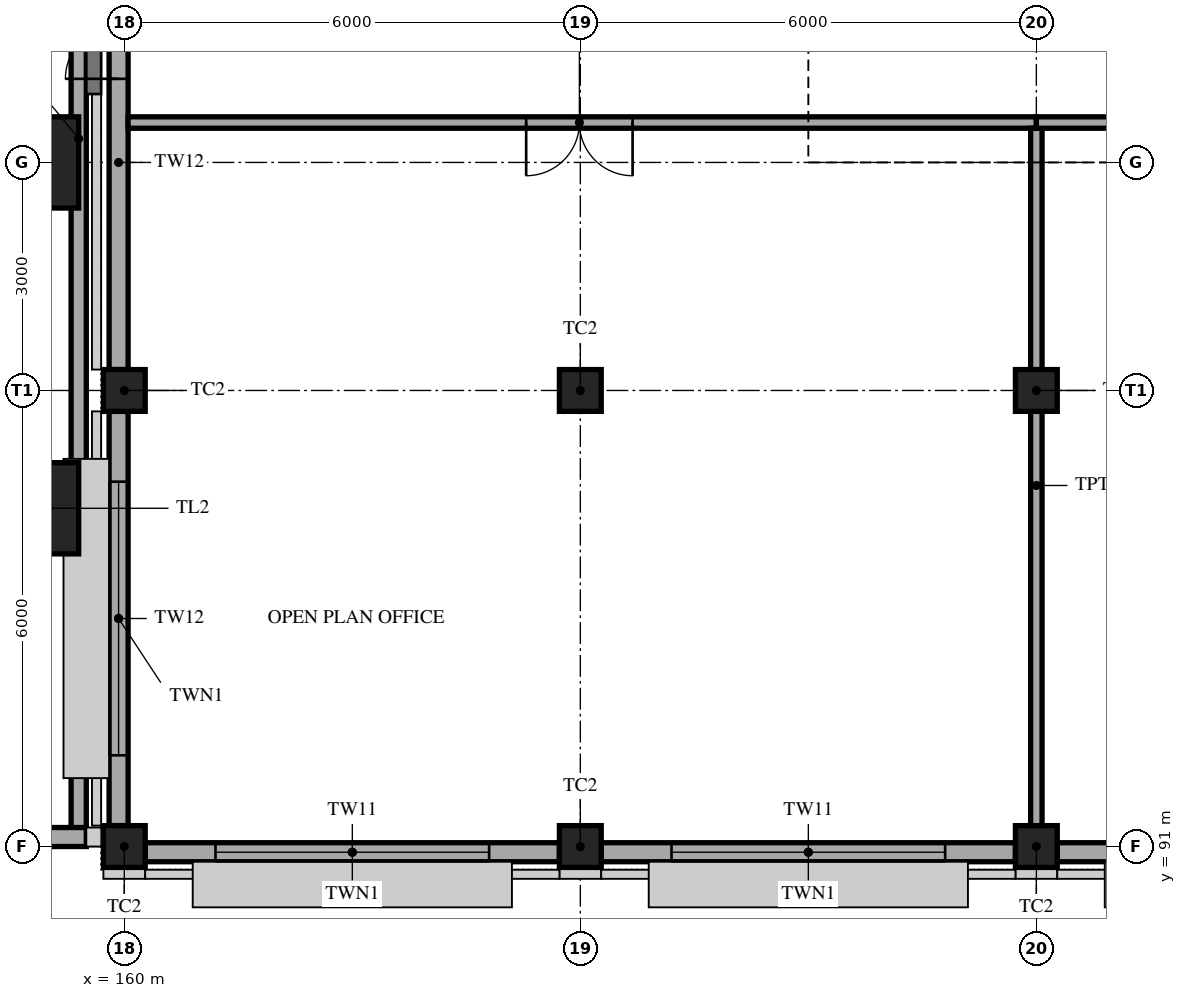
"""IFC4 building model, lengths in metres.
Left out: names, types, materials, properties, quantities, classifications, styles, units other than length and angle.
Written with IfcOpenShell. Run it as: python <this file> out.ifc"""

import sys

from ifc_helpers import new_model, si_unit, direction, frame, frame_2d, origin, origin_2d, place, context, subcontext, project, spatial, polyline, rectangle, hollow_rectangle, outline, extrude, element, fill, save


model = new_model("IFC4")
c1 = context("Model", 3, precision=1e-05, world=origin(), true_north=direction((0.0, 1.0)))
c2 = subcontext(c1, "Body", "Model", "MODEL_VIEW")
j1 = project(units=[si_unit("LENGTHUNIT", "METRE"), si_unit("PLANEANGLEUNIT", "RADIAN")], contexts=[c1])
p1 = place(None, origin())
s1 = spatial("IfcSite", under=j1, at=p1, CompositionType="ELEMENT")
p2 = place(p1, origin())
s2 = spatial("IfcBuilding", under=s1, at=p2, CompositionType="ELEMENT")
p3 = place(p2, frame((0.0, 0.0, 15.0)))
s3 = spatial("IfcBuildingStorey", under=s2, at=p3, CompositionType="ELEMENT", Elevation=15.0)
for number, where, z_axis, x_axis in (
    (1, (160.0, 91.0, 0.0), (0.0, 0.0, 1.0), (1.0, 0.0, 0.0)),
    (2, (160.0, 97.0, 0.0), (0.0, 0.0, 1.0), (1.0, 0.0, 0.0)),
    (3, (166.0, 91.0, 0.0), (0.0, 0.0, 1.0), (1.0, 0.0, 0.0)),
    (4, (172.0, 91.0, 0.0), (0.0, 0.0, 1.0), (1.0, 0.0, 0.0)),
    (5, (166.0, 97.0, 0.0), (0.0, 0.0, 1.0), (1.0, 0.0, 0.0)),
    (6, (172.0, 97.0, 0.0), (0.0, 0.0, 1.0), (1.0, 0.0, 0.0)),
):
    element("IfcColumn", number, at=place(p3, frame(where, z_axis=z_axis, x_axis=x_axis)), inside=s3, PredefinedType="COLUMN", context=c2, shape_type="SweptSolid", body=[
        extrude(hollow_rectangle(XDim=0.55, YDim=0.55, WallThickness=0.032, at=origin_2d()), origin(), (0.0, 0.0, 1.0), 4.2),
    ])
for number, where, z_axis, x_axis in (
    (7, (159.0, 95.45, 0.0), (0.0, 0.0, 1.0), (1.0, 0.0, 0.0)),
    (8, (159.0, 100.0, 0.0), (0.0, 0.0, 1.0), (1.0, 0.0, 0.0)),
):
    element("IfcColumn", number, at=place(p3, frame(where, z_axis=z_axis, x_axis=x_axis)), inside=s3, PredefinedType="COLUMN", context=c2, shape_type="SweptSolid", body=[
        extrude(rectangle(XDim=0.8, YDim=1.2, at=origin_2d()), origin(), (0.0, 0.0, 1.0), 4.2),
    ])
p4 = place(p3, frame((150.8, 91.125, 4.2), z_axis=(0.0, 0.0, 1.0), x_axis=(1.0, 0.0, 0.0)))
e9 = element("IfcWall", 9, at=p4, inside=s3, PredefinedType="PARAPET", context=c2, shape_type="SweptSolid", body=[
    extrude(rectangle(XDim=8.6, YDim=0.2, at=frame_2d((4.3, 0.0))), origin(), (0.0, 0.0, 1.0), 1.1),
])
p5 = place(p3, frame((159.4, 91.225, 4.2), z_axis=(0.0, 0.0, 1.0), x_axis=(0.0, 1.0, 0.0)))
e10 = element("IfcWall", 10, at=p5, inside=s3, PredefinedType="PARAPET", context=c2, shape_type="SweptSolid", body=[
    extrude(rectangle(XDim=18.175, YDim=0.2, at=frame_2d((9.087, 0.0))), origin(), (0.0, 0.0, 1.0), 1.1),
])
p6 = place(p3, frame((160.275, 90.925, 0.0), z_axis=(0.0, 0.0, 1.0), x_axis=(1.0, 0.0, 0.0)))
e11 = element("IfcWall", 11, at=p6, inside=s3, PredefinedType="SOLIDWALL", context=c2, shape_type="SweptSolid", body=[
    extrude(rectangle(XDim=5.45, YDim=0.25, at=frame_2d((2.725, 0.0))), origin(), (0.0, 0.0, 1.0), 3.55),
])
p7 = place(p6, frame((0.925, 0.0, 0.9)))
e12 = element("IfcOpeningElement", 12, at=p7, cuts=e11, PredefinedType="OPENING", context=c2, shape_type="SweptSolid", body=[
    extrude(rectangle(XDim=3.6, YDim=2.4, at=frame_2d((1.8, 1.2))), frame((0.0, 0.135, 0.0), z_axis=(0.0, -1.0, 0.0), x_axis=(1.0, 0.0, 0.0)), (0.0, 0.0, 1.0), 0.27),
])
p8 = place(p3, frame((166.275, 90.925, 0.0), z_axis=(0.0, 0.0, 1.0), x_axis=(1.0, 0.0, 0.0)))
e13 = element("IfcWall", 13, at=p8, inside=s3, PredefinedType="SOLIDWALL", context=c2, shape_type="SweptSolid", body=[
    extrude(rectangle(XDim=5.45, YDim=0.25, at=frame_2d((2.725, 0.0))), origin(), (0.0, 0.0, 1.0), 3.55),
])
p9 = place(p8, frame((0.925, 0.0, 0.9)))
e14 = element("IfcOpeningElement", 14, at=p9, cuts=e13, PredefinedType="OPENING", context=c2, shape_type="SweptSolid", body=[
    extrude(rectangle(XDim=3.6, YDim=2.4, at=frame_2d((1.8, 1.2))), frame((0.0, 0.135, 0.0), z_axis=(0.0, -1.0, 0.0), x_axis=(1.0, 0.0, 0.0)), (0.0, 0.0, 1.0), 0.27),
])
p10 = place(p3, frame((172.275, 90.925, 0.0), z_axis=(0.0, 0.0, 1.0), x_axis=(1.0, 0.0, 0.0)))
e15 = element("IfcWall", 15, at=p10, inside=s3, PredefinedType="SOLIDWALL", context=c2, shape_type="SweptSolid", body=[
    extrude(rectangle(XDim=5.45, YDim=0.25, at=frame_2d((2.725, 0.0))), origin(), (0.0, 0.0, 1.0), 3.55),
])
p11 = place(p10, frame((0.925, 0.0, 0.9)))
e16 = element("IfcOpeningElement", 16, at=p11, cuts=e15, PredefinedType="OPENING", context=c2, shape_type="SweptSolid", body=[
    extrude(rectangle(XDim=3.6, YDim=2.4, at=frame_2d((1.8, 1.2))), frame((0.0, 0.135, 0.0), z_axis=(0.0, -1.0, 0.0), x_axis=(1.0, 0.0, 0.0)), (0.0, 0.0, 1.0), 0.27),
])
p12 = place(p3, frame((159.925, 91.275, 0.0), z_axis=(0.0, 0.0, 1.0), x_axis=(0.0, 1.0, 0.0)))
e17 = element("IfcWall", 17, at=p12, inside=s3, PredefinedType="SOLIDWALL", context=c2, shape_type="SweptSolid", body=[
    extrude(rectangle(XDim=5.45, YDim=0.25, at=frame_2d((2.725, 0.0))), origin(), (0.0, 0.0, 1.0), 3.55),
])
p13 = place(p12, frame((0.925, 0.0, 0.9)))
e18 = element("IfcOpeningElement", 18, at=p13, cuts=e17, PredefinedType="OPENING", context=c2, shape_type="SweptSolid", body=[
    extrude(rectangle(XDim=3.6, YDim=2.4, at=frame_2d((1.8, 1.2))), frame((0.0, 0.135, 0.0), z_axis=(0.0, -1.0, 0.0), x_axis=(1.0, 0.0, 0.0)), (0.0, 0.0, 1.0), 0.27),
])
p14 = place(p3, frame((159.925, 97.275, 0.0), z_axis=(0.0, 0.0, 1.0), x_axis=(0.0, 1.0, 0.0)))
e19 = element("IfcWall", 19, at=p14, inside=s3, PredefinedType="SOLIDWALL", context=c2, shape_type="SweptSolid", body=[
    extrude(rectangle(XDim=5.45, YDim=0.25, at=frame_2d((2.725, 0.0))), origin(), (0.0, 0.0, 1.0), 3.55),
])
p15 = place(p14, frame((3.825, 0.0, 0.0)))
e20 = element("IfcOpeningElement", 20, at=p15, cuts=e19, PredefinedType="OPENING", context=c2, shape_type="SweptSolid", body=[
    extrude(rectangle(XDim=1.4, YDim=2.1, at=frame_2d((0.7, 1.05))), frame((0.0, 0.135, 0.0), z_axis=(0.0, -1.0, 0.0), x_axis=(1.0, 0.0, 0.0)), (0.0, 0.0, 1.0), 0.27),
])
p16 = place(p3, frame((152.45, 91.125, 0.0), z_axis=(0.0, 0.0, 1.0), x_axis=(1.0, 0.0, 0.0)))
e21 = element("IfcWall", 21, at=p16, inside=s3, PredefinedType="SOLIDWALL", context=c2, shape_type="SweptSolid", body=[
    extrude(rectangle(XDim=7.05, YDim=0.25, at=frame_2d((3.525, 0.0))), origin(), (0.0, 0.0, 1.0), 3.79),
])
p17 = place(p3, frame((160.05, 100.525, 0.0), z_axis=(0.0, 0.0, 1.0), x_axis=(1.0, 0.0, 0.0)))
e22 = element("IfcWall", 22, at=p17, inside=s3, PredefinedType="PARTITIONING", context=c2, shape_type="SweptSolid", body=[
    extrude(rectangle(XDim=11.95, YDim=0.15, at=frame_2d((5.975, 0.0))), origin(), (0.0, 0.0, 1.0), 3.4),
])
p18 = place(p17, frame((5.238, 0.0, 0.0)))
e23 = element("IfcOpeningElement", 23, at=p18, cuts=e22, PredefinedType="OPENING", context=c2, shape_type="SweptSolid", body=[
    extrude(rectangle(XDim=1.4, YDim=2.1, at=frame_2d((0.7, 1.05))), frame((0.0, 0.085, 0.0), z_axis=(0.0, -1.0, 0.0), x_axis=(1.0, 0.0, 0.0)), (0.0, 0.0, 1.0), 0.17),
])
p19 = place(p3, frame((172.0, 91.05, 0.0), z_axis=(0.0, 0.0, 1.0), x_axis=(0.0, 1.0, 0.0)))
e24 = element("IfcWall", 24, at=p19, inside=s3, PredefinedType="PARTITIONING", context=c2, shape_type="SweptSolid", body=[
    extrude(rectangle(XDim=9.4, YDim=0.15, at=frame_2d((4.7, 0.0))), origin(), (0.0, 0.0, 1.0), 3.4),
])
p20 = place(p3, frame((172.0, 100.525, 0.0), z_axis=(0.0, 0.0, 1.0), x_axis=(1.0, 0.0, 0.0)))
e25 = element("IfcWall", 25, at=p20, inside=s3, PredefinedType="PARTITIONING", context=c2, shape_type="SweptSolid", body=[
    extrude(rectangle(XDim=6.0, YDim=0.15, at=frame_2d((3.0, 0.0))), origin(), (0.0, 0.0, 1.0), 3.4),
])
p21 = place(p20, frame((2.5, 0.0, 0.0)))
e26 = element("IfcOpeningElement", 26, at=p21, cuts=e25, PredefinedType="OPENING", context=c2, shape_type="SweptSolid", body=[
    extrude(rectangle(XDim=1.0, YDim=2.1, at=frame_2d((0.5, 1.05))), frame((0.0, 0.085, 0.0), z_axis=(0.0, -1.0, 0.0), x_axis=(1.0, 0.0, 0.0)), (0.0, 0.0, 1.0), 0.17),
])
p22 = place(p7, origin())
e27 = element("IfcWindow", 27, at=p22, inside=s3, PartitioningType="TRIPLE_PANEL_VERTICAL", PredefinedType="WINDOW", context=c2, shape_type="SweptSolid", body=[
    extrude(outline(polyline([(0.0, 0.0), (3.6, 0.0), (3.6, 2.4), (0.0, 2.4), (0.0, 0.0)]), holes=[polyline([(0.06, 0.06), (0.96, 0.06), (0.96, 2.34), (0.06, 2.34), (0.06, 0.06)]), polyline([(1.06, 0.06), (2.54, 0.06), (2.54, 2.34), (1.06, 2.34), (1.06, 0.06)]), polyline([(2.64, 0.06), (3.54, 0.06), (3.54, 2.34), (2.64, 2.34), (2.64, 0.06)])]), frame((0.0, 0.03, 0.0), z_axis=(0.0, -1.0, 0.0), x_axis=(1.0, 0.0, 0.0)), (0.0, 0.0, 1.0), 0.06),
    extrude(rectangle(XDim=0.924, YDim=2.304, at=frame_2d((0.51, 1.2))), frame((0.0, 0.01, 0.0), z_axis=(0.0, -1.0, 0.0), x_axis=(1.0, 0.0, 0.0)), (0.0, 0.0, 1.0), 0.02),
    extrude(rectangle(XDim=1.504, YDim=2.304, at=frame_2d((1.8, 1.2))), frame((0.0, 0.01, 0.0), z_axis=(0.0, -1.0, 0.0), x_axis=(1.0, 0.0, 0.0)), (0.0, 0.0, 1.0), 0.02),
    extrude(rectangle(XDim=0.924, YDim=2.304, at=frame_2d((3.09, 1.2))), frame((0.0, 0.01, 0.0), z_axis=(0.0, -1.0, 0.0), x_axis=(1.0, 0.0, 0.0)), (0.0, 0.0, 1.0), 0.02),
])
fill(e12, e27)
p23 = place(p9, origin())
e28 = element("IfcWindow", 28, at=p23, inside=s3, PartitioningType="TRIPLE_PANEL_VERTICAL", PredefinedType="WINDOW", context=c2, shape_type="SweptSolid", body=[
    extrude(outline(polyline([(0.0, 0.0), (3.6, 0.0), (3.6, 2.4), (0.0, 2.4), (0.0, 0.0)]), holes=[polyline([(0.06, 0.06), (0.96, 0.06), (0.96, 2.34), (0.06, 2.34), (0.06, 0.06)]), polyline([(1.06, 0.06), (2.54, 0.06), (2.54, 2.34), (1.06, 2.34), (1.06, 0.06)]), polyline([(2.64, 0.06), (3.54, 0.06), (3.54, 2.34), (2.64, 2.34), (2.64, 0.06)])]), frame((0.0, 0.03, 0.0), z_axis=(0.0, -1.0, 0.0), x_axis=(1.0, 0.0, 0.0)), (0.0, 0.0, 1.0), 0.06),
    extrude(rectangle(XDim=0.924, YDim=2.304, at=frame_2d((0.51, 1.2))), frame((0.0, 0.01, 0.0), z_axis=(0.0, -1.0, 0.0), x_axis=(1.0, 0.0, 0.0)), (0.0, 0.0, 1.0), 0.02),
    extrude(rectangle(XDim=1.504, YDim=2.304, at=frame_2d((1.8, 1.2))), frame((0.0, 0.01, 0.0), z_axis=(0.0, -1.0, 0.0), x_axis=(1.0, 0.0, 0.0)), (0.0, 0.0, 1.0), 0.02),
    extrude(rectangle(XDim=0.924, YDim=2.304, at=frame_2d((3.09, 1.2))), frame((0.0, 0.01, 0.0), z_axis=(0.0, -1.0, 0.0), x_axis=(1.0, 0.0, 0.0)), (0.0, 0.0, 1.0), 0.02),
])
fill(e14, e28)
p24 = place(p13, origin())
e29 = element("IfcWindow", 29, at=p24, inside=s3, PartitioningType="TRIPLE_PANEL_VERTICAL", PredefinedType="WINDOW", context=c2, shape_type="SweptSolid", body=[
    extrude(outline(polyline([(0.0, 0.0), (3.6, 0.0), (3.6, 2.4), (0.0, 2.4), (0.0, 0.0)]), holes=[polyline([(0.06, 0.06), (0.96, 0.06), (0.96, 2.34), (0.06, 2.34), (0.06, 0.06)]), polyline([(1.06, 0.06), (2.54, 0.06), (2.54, 2.34), (1.06, 2.34), (1.06, 0.06)]), polyline([(2.64, 0.06), (3.54, 0.06), (3.54, 2.34), (2.64, 2.34), (2.64, 0.06)])]), frame((0.0, 0.03, 0.0), z_axis=(0.0, -1.0, 0.0), x_axis=(1.0, 0.0, 0.0)), (0.0, 0.0, 1.0), 0.06),
    extrude(rectangle(XDim=0.924, YDim=2.304, at=frame_2d((0.51, 1.2))), frame((0.0, 0.01, 0.0), z_axis=(0.0, -1.0, 0.0), x_axis=(1.0, 0.0, 0.0)), (0.0, 0.0, 1.0), 0.02),
    extrude(rectangle(XDim=1.504, YDim=2.304, at=frame_2d((1.8, 1.2))), frame((0.0, 0.01, 0.0), z_axis=(0.0, -1.0, 0.0), x_axis=(1.0, 0.0, 0.0)), (0.0, 0.0, 1.0), 0.02),
    extrude(rectangle(XDim=0.924, YDim=2.304, at=frame_2d((3.09, 1.2))), frame((0.0, 0.01, 0.0), z_axis=(0.0, -1.0, 0.0), x_axis=(1.0, 0.0, 0.0)), (0.0, 0.0, 1.0), 0.02),
])
fill(e18, e29)
p25 = place(p15, origin())
e30 = element("IfcDoor", 30, at=p25, inside=s3, OperationType="DOUBLE_DOOR_SINGLE_SWING", PredefinedType="DOOR", context=c2, shape_type="SweptSolid", body=[
    extrude(rectangle(XDim=1.4, YDim=2.1, at=frame_2d((0.7, 1.05))), frame((0.0, 0.025, 0.0), z_axis=(0.0, -1.0, 0.0), x_axis=(1.0, 0.0, 0.0)), (0.0, 0.0, 1.0), 0.05),
])
fill(e20, e30)
p26 = place(p18, frame((1.4, 0.0, 0.0), z_axis=(0.0, 0.0, 1.0), x_axis=(-1.0, 0.0, 0.0)))
e31 = element("IfcDoor", 31, at=p26, inside=s3, OperationType="DOUBLE_DOOR_SINGLE_SWING", PredefinedType="DOOR", context=c2, shape_type="SweptSolid", body=[
    extrude(rectangle(XDim=1.4, YDim=2.1, at=frame_2d((0.7, 1.05))), frame((0.0, 0.025, 0.0), z_axis=(0.0, -1.0, 0.0), x_axis=(1.0, 0.0, 0.0)), (0.0, 0.0, 1.0), 0.05),
])
fill(e23, e31)
save(model, sys.argv[1])
